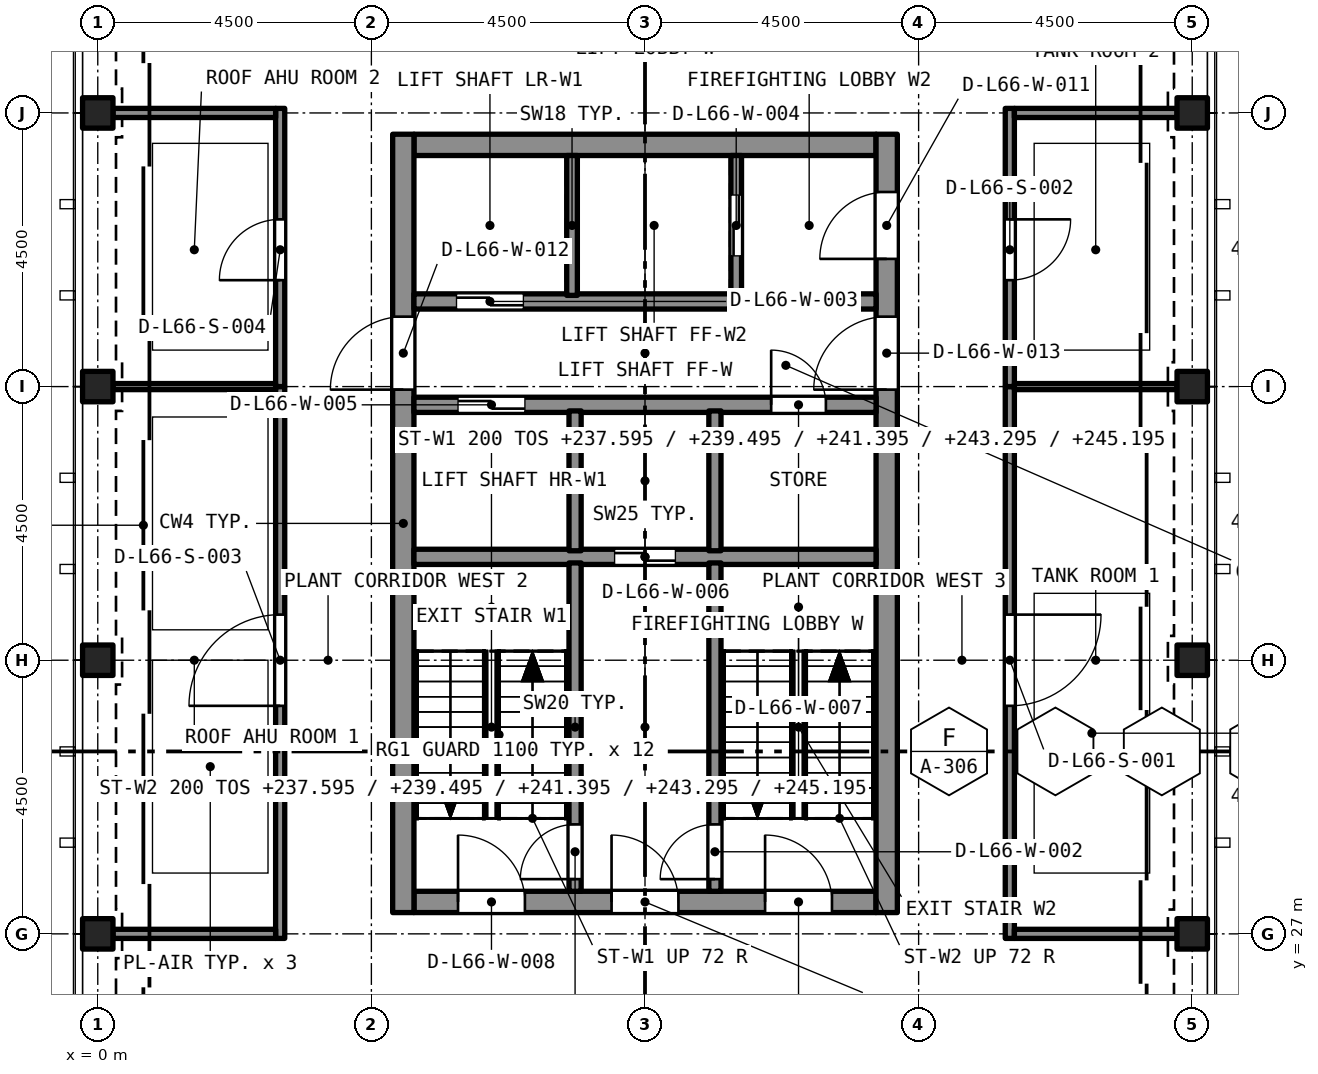
"""IFC4 building model, lengths in metres.
Left out: names, types, materials, properties, quantities, classifications, styles, units other than length and angle.
Written with IfcOpenShell. Run it as: python <this file> out.ifc"""

import sys

from ifc_helpers import new_model, si_unit, direction, frame, frame_2d, origin, origin_2d, place, context, subcontext, project, spatial, rectangle, hollow_rectangle, extrude, element, fill, save


model = new_model("IFC4")
c1 = context("Model", 3, precision=1e-05, world=origin(), true_north=direction((0.0, 1.0)))
c2 = subcontext(c1, "Body", "Model", "MODEL_VIEW")
j1 = project(units=[si_unit("LENGTHUNIT", "METRE"), si_unit("PLANEANGLEUNIT", "RADIAN")], contexts=[c1])
p1 = place(None, origin())
s1 = spatial("IfcSite", under=j1, at=p1, CompositionType="ELEMENT")
p2 = place(p1, origin())
s2 = spatial("IfcBuilding", under=s1, at=p2, CompositionType="ELEMENT")
p3 = place(p2, frame((0.0, 0.0, 235.695)))
s3 = spatial("IfcBuildingStorey", under=s2, at=p3, CompositionType="ELEMENT", Elevation=235.695)
p4 = place(p3, frame((5.2, 27.525, 0.0), z_axis=(0.0, 0.0, 1.0), x_axis=(1.0, 0.0, 0.0)))
e1 = element("IfcWall", 1, at=p4, inside=s3, PredefinedType="SOLIDWALL", context=c2, shape_type="SweptSolid", body=[
    extrude(rectangle(XDim=7.6, YDim=0.35, at=frame_2d((3.8, 0.0))), origin(), (0.0, 0.0, 1.0), 11.4),
])
p5 = place(p4, frame((0.725, 0.0, 0.0)))
e2 = element("IfcOpeningElement", 2, at=p5, cuts=e1, PredefinedType="OPENING", context=c2, shape_type="SweptSolid", body=[
    extrude(rectangle(XDim=1.1, YDim=2.1, at=frame_2d((0.55, 1.05))), frame((0.0, 0.185, 0.0), z_axis=(0.0, -1.0, 0.0), x_axis=(1.0, 0.0, 0.0)), (0.0, 0.0, 1.0), 0.37),
])
p6 = place(p4, frame((3.25, 0.0, 0.0)))
e3 = element("IfcOpeningElement", 3, at=p6, cuts=e1, PredefinedType="OPENING", context=c2, shape_type="SweptSolid", body=[
    extrude(rectangle(XDim=1.1, YDim=2.1, at=frame_2d((0.55, 1.05))), frame((0.0, 0.185, 0.0), z_axis=(0.0, -1.0, 0.0), x_axis=(1.0, 0.0, 0.0)), (0.0, 0.0, 1.0), 0.37),
])
p7 = place(p4, frame((5.775, 0.0, 0.0)))
e4 = element("IfcOpeningElement", 4, at=p7, cuts=e1, PredefinedType="OPENING", context=c2, shape_type="SweptSolid", body=[
    extrude(rectangle(XDim=1.1, YDim=2.1, at=frame_2d((0.55, 1.05))), frame((0.0, 0.185, 0.0), z_axis=(0.0, -1.0, 0.0), x_axis=(1.0, 0.0, 0.0)), (0.0, 0.0, 1.0), 0.37),
])
p8 = place(p3, frame((5.2, 39.975, 0.0), z_axis=(0.0, 0.0, 1.0), x_axis=(1.0, 0.0, 0.0)))
e5 = element("IfcWall", 5, at=p8, inside=s3, PredefinedType="SOLIDWALL", context=c2, shape_type="SweptSolid", body=[
    extrude(rectangle(XDim=7.6, YDim=0.35, at=frame_2d((3.8, 0.0))), origin(), (0.0, 0.0, 1.0), 11.4),
])
p9 = place(p3, frame((5.025, 27.35, 0.0), z_axis=(0.0, 0.0, 1.0), x_axis=(0.0, 1.0, 0.0)))
e6 = element("IfcWall", 6, at=p9, inside=s3, PredefinedType="SOLIDWALL", context=c2, shape_type="SweptSolid", body=[
    extrude(rectangle(XDim=12.8, YDim=0.35, at=frame_2d((6.4, 0.0))), origin(), (0.0, 0.0, 1.0), 11.4),
])
p10 = place(p9, frame((8.6, 0.0, 0.0)))
e7 = element("IfcOpeningElement", 7, at=p10, cuts=e6, PredefinedType="OPENING", context=c2, shape_type="SweptSolid", body=[
    extrude(rectangle(XDim=1.2, YDim=2.1, at=frame_2d((0.6, 1.05))), frame((0.0, 0.185, 0.0), z_axis=(0.0, -1.0, 0.0), x_axis=(1.0, 0.0, 0.0)), (0.0, 0.0, 1.0), 0.37),
])
p11 = place(p3, frame((12.975, 27.35, 0.0), z_axis=(0.0, 0.0, 1.0), x_axis=(0.0, 1.0, 0.0)))
e8 = element("IfcWall", 8, at=p11, inside=s3, PredefinedType="SOLIDWALL", context=c2, shape_type="SweptSolid", body=[
    extrude(rectangle(XDim=12.8, YDim=0.35, at=frame_2d((6.4, 0.0))), origin(), (0.0, 0.0, 1.0), 11.4),
])
p12 = place(p11, frame((10.75, 0.0, 0.0)))
e9 = element("IfcOpeningElement", 9, at=p12, cuts=e8, PredefinedType="OPENING", context=c2, shape_type="SweptSolid", body=[
    extrude(rectangle(XDim=1.1, YDim=2.1, at=frame_2d((0.55, 1.05))), frame((0.0, 0.185, 0.0), z_axis=(0.0, -1.0, 0.0), x_axis=(1.0, 0.0, 0.0)), (0.0, 0.0, 1.0), 0.37),
])
p13 = place(p11, frame((8.6, 0.0, 0.0)))
e10 = element("IfcOpeningElement", 10, at=p13, cuts=e8, PredefinedType="OPENING", context=c2, shape_type="SweptSolid", body=[
    extrude(rectangle(XDim=1.2, YDim=2.1, at=frame_2d((0.6, 1.05))), frame((0.0, 0.185, 0.0), z_axis=(0.0, -1.0, 0.0), x_axis=(1.0, 0.0, 0.0)), (0.0, 0.0, 1.0), 0.37),
])
for number, where, z_axis, x_axis in (
    (11, (0.0, 27.0, 0.0), (0.0, 0.0, 1.0), (1.0, 0.0, 0.0)),
    (12, (18.0, 27.0, 0.0), (0.0, 0.0, 1.0), (1.0, 0.0, 0.0)),
    (13, (0.0, 31.5, 0.0), (0.0, 0.0, 1.0), (1.0, 0.0, 0.0)),
    (14, (18.0, 31.5, 0.0), (0.0, 0.0, 1.0), (1.0, 0.0, 0.0)),
    (15, (0.0, 36.0, 0.0), (0.0, 0.0, 1.0), (1.0, 0.0, 0.0)),
    (16, (18.0, 36.0, 0.0), (0.0, 0.0, 1.0), (1.0, 0.0, 0.0)),
    (17, (0.0, 40.5, 0.0), (0.0, 0.0, 1.0), (1.0, 0.0, 0.0)),
    (18, (18.0, 40.5, 0.0), (0.0, 0.0, 1.0), (1.0, 0.0, 0.0)),
):
    element("IfcColumn", number, at=place(p3, frame(where, z_axis=z_axis, x_axis=x_axis)), inside=s3, PredefinedType="COLUMN", context=c2, shape_type="SweptSolid", body=[
        extrude(hollow_rectangle(XDim=0.5, YDim=0.5, WallThickness=0.04, at=origin_2d()), origin(), (0.0, 0.0, 1.0), 11.4),
    ])
p14 = place(p3, frame((5.2, 33.2, 0.0), z_axis=(0.0, 0.0, 1.0), x_axis=(1.0, 0.0, 0.0)))
e19 = element("IfcWall", 19, at=p14, inside=s3, PredefinedType="SOLIDWALL", context=c2, shape_type="SweptSolid", body=[
    extrude(rectangle(XDim=7.6, YDim=0.25, at=frame_2d((3.8, 0.0))), origin(), (0.0, 0.0, 1.0), 11.05),
])
p15 = place(p14, frame((3.3, 0.0, 0.0)))
e20 = element("IfcOpeningElement", 20, at=p15, cuts=e19, PredefinedType="OPENING", context=c2, shape_type="SweptSolid", body=[
    extrude(rectangle(XDim=1.0, YDim=2.1, at=frame_2d((0.5, 1.05))), frame((0.0, 0.135, 0.0), z_axis=(0.0, -1.0, 0.0), x_axis=(1.0, 0.0, 0.0)), (0.0, 0.0, 1.0), 0.27),
])
p16 = place(p3, frame((5.2, 35.7, 0.0), z_axis=(0.0, 0.0, 1.0), x_axis=(1.0, 0.0, 0.0)))
e21 = element("IfcWall", 21, at=p16, inside=s3, PredefinedType="SOLIDWALL", context=c2, shape_type="SweptSolid", body=[
    extrude(rectangle(XDim=7.6, YDim=0.25, at=frame_2d((3.8, 0.0))), origin(), (0.0, 0.0, 1.0), 11.05),
])
p17 = place(p16, frame((0.725, 0.0, 0.0)))
e22 = element("IfcOpeningElement", 22, at=p17, cuts=e21, PredefinedType="OPENING", context=c2, shape_type="SweptSolid", body=[
    extrude(rectangle(XDim=1.1, YDim=2.4, at=frame_2d((0.55, 1.2))), frame((0.0, 0.135, 0.0), z_axis=(0.0, -1.0, 0.0), x_axis=(1.0, 0.0, 0.0)), (0.0, 0.0, 1.0), 0.27),
])
p18 = place(p16, frame((5.875, 0.0, 0.0)))
e23 = element("IfcOpeningElement", 23, at=p18, cuts=e21, PredefinedType="OPENING", context=c2, shape_type="SweptSolid", body=[
    extrude(rectangle(XDim=0.9, YDim=2.1, at=frame_2d((0.45, 1.05))), frame((0.0, 0.135, 0.0), z_axis=(0.0, -1.0, 0.0), x_axis=(1.0, 0.0, 0.0)), (0.0, 0.0, 1.0), 0.27),
])
p19 = place(p3, frame((5.2, 37.4, 0.0), z_axis=(0.0, 0.0, 1.0), x_axis=(1.0, 0.0, 0.0)))
e24 = element("IfcWall", 24, at=p19, inside=s3, PredefinedType="SOLIDWALL", context=c2, shape_type="SweptSolid", body=[
    extrude(rectangle(XDim=7.6, YDim=0.25, at=frame_2d((3.8, 0.0))), origin(), (0.0, 0.0, 1.0), 11.05),
])
p20 = place(p19, frame((0.7, 0.0, 0.0)))
e25 = element("IfcOpeningElement", 25, at=p20, cuts=e24, PredefinedType="OPENING", context=c2, shape_type="SweptSolid", body=[
    extrude(rectangle(XDim=1.1, YDim=2.4, at=frame_2d((0.55, 1.2))), frame((0.0, 0.135, 0.0), z_axis=(0.0, -1.0, 0.0), x_axis=(1.0, 0.0, 0.0)), (0.0, 0.0, 1.0), 0.27),
])
p21 = place(p3, frame((7.85, 27.7, 0.0), z_axis=(0.0, 0.0, 1.0), x_axis=(0.0, 1.0, 0.0)))
e26 = element("IfcWall", 26, at=p21, inside=s3, PredefinedType="SOLIDWALL", context=c2, shape_type="SweptSolid", body=[
    extrude(rectangle(XDim=5.4, YDim=0.2, at=frame_2d((2.7, 0.0))), origin(), (0.0, 0.0, 1.0), 11.05),
])
p22 = place(p21, frame((0.2, 0.0, 0.0)))
e27 = element("IfcOpeningElement", 27, at=p22, cuts=e26, PredefinedType="OPENING", context=c2, shape_type="SweptSolid", body=[
    extrude(rectangle(XDim=0.9, YDim=2.1, at=frame_2d((0.45, 1.05))), frame((0.0, 0.11, 0.0), z_axis=(0.0, -1.0, 0.0), x_axis=(1.0, 0.0, 0.0)), (0.0, 0.0, 1.0), 0.22),
])
p23 = place(p3, frame((10.15, 27.7, 0.0), z_axis=(0.0, 0.0, 1.0), x_axis=(0.0, 1.0, 0.0)))
e28 = element("IfcWall", 28, at=p23, inside=s3, PredefinedType="SOLIDWALL", context=c2, shape_type="SweptSolid", body=[
    extrude(rectangle(XDim=5.4, YDim=0.2, at=frame_2d((2.7, 0.0))), origin(), (0.0, 0.0, 1.0), 11.05),
])
p24 = place(p23, frame((0.2, 0.0, 0.0)))
e29 = element("IfcOpeningElement", 29, at=p24, cuts=e28, PredefinedType="OPENING", context=c2, shape_type="SweptSolid", body=[
    extrude(rectangle(XDim=0.9, YDim=2.1, at=frame_2d((0.45, 1.05))), frame((0.0, 0.11, 0.0), z_axis=(0.0, -1.0, 0.0), x_axis=(1.0, 0.0, 0.0)), (0.0, 0.0, 1.0), 0.22),
])
for number, where, z_axis, x_axis in (
    (30, (7.85, 33.3, 0.0), (0.0, 0.0, 1.0), (0.0, 1.0, 0.0)),
    (31, (10.15, 33.3, 0.0), (0.0, 0.0, 1.0), (0.0, 1.0, 0.0)),
):
    element("IfcWall", number, at=place(p3, frame(where, z_axis=z_axis, x_axis=x_axis)), inside=s3, PredefinedType="SOLIDWALL", context=c2, shape_type="SweptSolid", body=[
        extrude(rectangle(XDim=2.3, YDim=0.2, at=frame_2d((1.15, 0.0))), origin(), (0.0, 0.0, 1.0), 11.05),
    ])
p25 = place(p3, frame((7.8, 37.5, 0.0), z_axis=(0.0, 0.0, 1.0), x_axis=(0.0, 1.0, 0.0)))
e32 = element("IfcWall", 32, at=p25, inside=s3, PredefinedType="SOLIDWALL", context=c2, shape_type="SweptSolid", body=[
    extrude(rectangle(XDim=2.3, YDim=0.175, at=frame_2d((1.15, 0.0))), origin(), (0.0, 0.0, 1.0), 11.05),
])
p26 = place(p3, frame((10.5, 37.5, 0.0), z_axis=(0.0, 0.0, 1.0), x_axis=(0.0, 1.0, 0.0)))
e33 = element("IfcWall", 33, at=p26, inside=s3, PredefinedType="SOLIDWALL", context=c2, shape_type="SweptSolid", body=[
    extrude(rectangle(XDim=2.3, YDim=0.175, at=frame_2d((1.15, 0.0))), origin(), (0.0, 0.0, 1.0), 11.05),
])
p27 = place(p26, frame((0.65, 0.0, 0.0)))
e34 = element("IfcOpeningElement", 34, at=p27, cuts=e33, PredefinedType="OPENING", context=c2, shape_type="SweptSolid", body=[
    extrude(rectangle(XDim=1.0, YDim=2.1, at=frame_2d((0.5, 1.05))), frame((0.0, 0.097, 0.0), z_axis=(0.0, -1.0, 0.0), x_axis=(1.0, 0.0, 0.0)), (0.0, 0.0, 1.0), 0.195),
])
p28 = place(p3, frame((15.0, 36.0, 0.0), z_axis=(0.0, 0.0, 1.0), x_axis=(0.0, -1.0, 0.0)))
e35 = element("IfcWall", 35, at=p28, inside=s3, PredefinedType="PARTITIONING", context=c2, shape_type="SweptSolid", body=[
    extrude(rectangle(XDim=9.075, YDim=0.15, at=frame_2d((4.538, 0.0))), origin(), (0.0, 0.0, 1.0), 11.05),
])
p29 = place(p28, frame((3.75, 0.0, 0.0)))
e36 = element("IfcOpeningElement", 36, at=p29, cuts=e35, PredefinedType="OPENING", context=c2, shape_type="SweptSolid", body=[
    extrude(rectangle(XDim=1.5, YDim=2.4, at=frame_2d((0.75, 1.2))), frame((0.0, 0.085, 0.0), z_axis=(0.0, -1.0, 0.0), x_axis=(1.0, 0.0, 0.0)), (0.0, 0.0, 1.0), 0.17),
])
p30 = place(p3, frame((15.0, 40.575, 0.0), z_axis=(0.0, 0.0, 1.0), x_axis=(0.0, -1.0, 0.0)))
e37 = element("IfcWall", 37, at=p30, inside=s3, PredefinedType="PARTITIONING", context=c2, shape_type="SweptSolid", body=[
    extrude(rectangle(XDim=4.575, YDim=0.15, at=frame_2d((2.288, 0.0))), origin(), (0.0, 0.0, 1.0), 11.05),
])
p31 = place(p30, frame((1.825, 0.0, 0.0)))
e38 = element("IfcOpeningElement", 38, at=p31, cuts=e37, PredefinedType="OPENING", context=c2, shape_type="SweptSolid", body=[
    extrude(rectangle(XDim=1.0, YDim=2.1, at=frame_2d((0.5, 1.05))), frame((0.0, 0.085, 0.0), z_axis=(0.0, -1.0, 0.0), x_axis=(1.0, 0.0, 0.0)), (0.0, 0.0, 1.0), 0.17),
])
p32 = place(p3, frame((3.0, 26.925, 0.0), z_axis=(0.0, 0.0, 1.0), x_axis=(0.0, 1.0, 0.0)))
e39 = element("IfcWall", 39, at=p32, inside=s3, PredefinedType="PARTITIONING", context=c2, shape_type="SweptSolid", body=[
    extrude(rectangle(XDim=9.075, YDim=0.15, at=frame_2d((4.538, 0.0))), origin(), (0.0, 0.0, 1.0), 11.05),
])
p33 = place(p32, frame((3.825, 0.0, 0.0)))
e40 = element("IfcOpeningElement", 40, at=p33, cuts=e39, PredefinedType="OPENING", context=c2, shape_type="SweptSolid", body=[
    extrude(rectangle(XDim=1.5, YDim=2.4, at=frame_2d((0.75, 1.2))), frame((0.0, 0.085, 0.0), z_axis=(0.0, -1.0, 0.0), x_axis=(1.0, 0.0, 0.0)), (0.0, 0.0, 1.0), 0.17),
])
p34 = place(p3, frame((3.0, 36.0, 0.0), z_axis=(0.0, 0.0, 1.0), x_axis=(0.0, 1.0, 0.0)))
e41 = element("IfcWall", 41, at=p34, inside=s3, PredefinedType="PARTITIONING", context=c2, shape_type="SweptSolid", body=[
    extrude(rectangle(XDim=4.575, YDim=0.15, at=frame_2d((2.288, 0.0))), origin(), (0.0, 0.0, 1.0), 11.05),
])
p35 = place(p34, frame((1.75, 0.0, 0.0)))
e42 = element("IfcOpeningElement", 42, at=p35, cuts=e41, PredefinedType="OPENING", context=c2, shape_type="SweptSolid", body=[
    extrude(rectangle(XDim=1.0, YDim=2.1, at=frame_2d((0.5, 1.05))), frame((0.0, 0.085, 0.0), z_axis=(0.0, -1.0, 0.0), x_axis=(1.0, 0.0, 0.0)), (0.0, 0.0, 1.0), 0.17),
])
for number, where, z_axis, x_axis in (
    (43, (15.075, 27.0, 0.0), (0.0, 0.0, 1.0), (1.0, 0.0, 0.0)),
    (44, (0.25, 27.0, 0.0), (0.0, 0.0, 1.0), (1.0, 0.0, 0.0)),
    (45, (15.075, 40.5, 0.0), (0.0, 0.0, 1.0), (1.0, 0.0, 0.0)),
    (46, (0.25, 40.5, 0.0), (0.0, 0.0, 1.0), (1.0, 0.0, 0.0)),
):
    element("IfcWall", number, at=place(p3, frame(where, z_axis=z_axis, x_axis=x_axis)), inside=s3, PredefinedType="PARTITIONING", context=c2, shape_type="SweptSolid", body=[
        extrude(rectangle(XDim=2.675, YDim=0.15, at=frame_2d((1.337, 0.0))), origin(), (0.0, 0.0, 1.0), 11.05),
    ])
for number, where, z_axis, x_axis in (
    (47, (15.075, 36.0, 0.0), (0.0, 0.0, 1.0), (1.0, 0.0, 0.0)),
    (48, (0.25, 36.0, 0.0), (0.0, 0.0, 1.0), (1.0, 0.0, 0.0)),
):
    element("IfcWall", number, at=place(p3, frame(where, z_axis=z_axis, x_axis=x_axis)), inside=s3, PredefinedType="PARTITIONING", context=c2, shape_type="SweptSolid", body=[
        extrude(rectangle(XDim=2.675, YDim=0.1, at=frame_2d((1.337, 0.0))), origin(), (0.0, 0.0, 1.0), 11.05),
    ])
p36 = place(p22, origin())
e49 = element("IfcDoor", 49, at=p36, inside=s3, OperationType="SINGLE_SWING_LEFT", PredefinedType="DOOR", context=c2, shape_type="SweptSolid", body=[
    extrude(rectangle(XDim=0.9, YDim=2.1, at=frame_2d((0.45, 1.05))), frame((0.0, 0.025, 0.0), z_axis=(0.0, -1.0, 0.0), x_axis=(1.0, 0.0, 0.0)), (0.0, 0.0, 1.0), 0.05),
])
fill(e27, e49)
p37 = place(p24, origin())
e50 = element("IfcDoor", 50, at=p37, inside=s3, OperationType="SINGLE_SWING_LEFT", PredefinedType="DOOR", context=c2, shape_type="SweptSolid", body=[
    extrude(rectangle(XDim=0.9, YDim=2.1, at=frame_2d((0.45, 1.05))), frame((0.0, 0.025, 0.0), z_axis=(0.0, -1.0, 0.0), x_axis=(1.0, 0.0, 0.0)), (0.0, 0.0, 1.0), 0.05),
])
fill(e29, e50)
p38 = place(p20, origin())
e51 = element("IfcDoor", 51, at=p38, inside=s3, OperationType="SLIDING_TO_LEFT", PredefinedType="DOOR", context=c2, shape_type="SweptSolid", body=[
    extrude(rectangle(XDim=1.1, YDim=2.4, at=frame_2d((0.55, 1.2))), frame((0.0, 0.025, 0.0), z_axis=(0.0, -1.0, 0.0), x_axis=(1.0, 0.0, 0.0)), (0.0, 0.0, 1.0), 0.05),
])
fill(e25, e51)
p39 = place(p27, origin())
e52 = element("IfcDoor", 52, at=p39, inside=s3, OperationType="SLIDING_TO_LEFT", PredefinedType="DOOR", context=c2, shape_type="SweptSolid", body=[
    extrude(rectangle(XDim=1.0, YDim=2.1, at=frame_2d((0.5, 1.05))), frame((0.0, 0.025, 0.0), z_axis=(0.0, -1.0, 0.0), x_axis=(1.0, 0.0, 0.0)), (0.0, 0.0, 1.0), 0.05),
])
fill(e34, e52)
p40 = place(p17, origin())
e53 = element("IfcDoor", 53, at=p40, inside=s3, OperationType="SLIDING_TO_LEFT", PredefinedType="DOOR", context=c2, shape_type="SweptSolid", body=[
    extrude(rectangle(XDim=1.1, YDim=2.4, at=frame_2d((0.55, 1.2))), frame((0.0, 0.025, 0.0), z_axis=(0.0, -1.0, 0.0), x_axis=(1.0, 0.0, 0.0)), (0.0, 0.0, 1.0), 0.05),
])
fill(e22, e53)
p41 = place(p15, origin())
e54 = element("IfcDoor", 54, at=p41, inside=s3, OperationType="SLIDING_TO_LEFT", PredefinedType="DOOR", context=c2, shape_type="SweptSolid", body=[
    extrude(rectangle(XDim=1.0, YDim=2.1, at=frame_2d((0.5, 1.05))), frame((0.0, 0.025, 0.0), z_axis=(0.0, -1.0, 0.0), x_axis=(1.0, 0.0, 0.0)), (0.0, 0.0, 1.0), 0.05),
])
fill(e20, e54)
p42 = place(p18, origin())
e55 = element("IfcDoor", 55, at=p42, inside=s3, OperationType="SINGLE_SWING_LEFT", PredefinedType="DOOR", context=c2, shape_type="SweptSolid", body=[
    extrude(rectangle(XDim=0.9, YDim=2.1, at=frame_2d((0.45, 1.05))), frame((0.0, 0.025, 0.0), z_axis=(0.0, -1.0, 0.0), x_axis=(1.0, 0.0, 0.0)), (0.0, 0.0, 1.0), 0.05),
])
fill(e23, e55)
p43 = place(p5, origin())
e56 = element("IfcDoor", 56, at=p43, inside=s3, OperationType="SINGLE_SWING_LEFT", PredefinedType="DOOR", context=c2, shape_type="SweptSolid", body=[
    extrude(rectangle(XDim=1.1, YDim=2.1, at=frame_2d((0.55, 1.05))), frame((0.0, 0.025, 0.0), z_axis=(0.0, -1.0, 0.0), x_axis=(1.0, 0.0, 0.0)), (0.0, 0.0, 1.0), 0.05),
])
fill(e2, e56)
p44 = place(p6, origin())
e57 = element("IfcDoor", 57, at=p44, inside=s3, OperationType="SINGLE_SWING_LEFT", PredefinedType="DOOR", context=c2, shape_type="SweptSolid", body=[
    extrude(rectangle(XDim=1.1, YDim=2.1, at=frame_2d((0.55, 1.05))), frame((0.0, 0.025, 0.0), z_axis=(0.0, -1.0, 0.0), x_axis=(1.0, 0.0, 0.0)), (0.0, 0.0, 1.0), 0.05),
])
fill(e3, e57)
p45 = place(p7, origin())
e58 = element("IfcDoor", 58, at=p45, inside=s3, OperationType="SINGLE_SWING_LEFT", PredefinedType="DOOR", context=c2, shape_type="SweptSolid", body=[
    extrude(rectangle(XDim=1.1, YDim=2.1, at=frame_2d((0.55, 1.05))), frame((0.0, 0.025, 0.0), z_axis=(0.0, -1.0, 0.0), x_axis=(1.0, 0.0, 0.0)), (0.0, 0.0, 1.0), 0.05),
])
fill(e4, e58)
p46 = place(p12, origin())
e59 = element("IfcDoor", 59, at=p46, inside=s3, OperationType="SINGLE_SWING_LEFT", PredefinedType="DOOR", context=c2, shape_type="SweptSolid", body=[
    extrude(rectangle(XDim=1.1, YDim=2.1, at=frame_2d((0.55, 1.05))), frame((0.0, 0.025, 0.0), z_axis=(0.0, -1.0, 0.0), x_axis=(1.0, 0.0, 0.0)), (0.0, 0.0, 1.0), 0.05),
])
fill(e9, e59)
p47 = place(p10, origin())
e60 = element("IfcDoor", 60, at=p47, inside=s3, OperationType="SINGLE_SWING_LEFT", PredefinedType="DOOR", context=c2, shape_type="SweptSolid", body=[
    extrude(rectangle(XDim=1.2, YDim=2.1, at=frame_2d((0.6, 1.05))), frame((0.0, 0.025, 0.0), z_axis=(0.0, -1.0, 0.0), x_axis=(1.0, 0.0, 0.0)), (0.0, 0.0, 1.0), 0.05),
])
fill(e7, e60)
p48 = place(p13, origin())
e61 = element("IfcDoor", 61, at=p48, inside=s3, OperationType="SINGLE_SWING_LEFT", PredefinedType="DOOR", context=c2, shape_type="SweptSolid", body=[
    extrude(rectangle(XDim=1.2, YDim=2.1, at=frame_2d((0.6, 1.05))), frame((0.0, 0.025, 0.0), z_axis=(0.0, -1.0, 0.0), x_axis=(1.0, 0.0, 0.0)), (0.0, 0.0, 1.0), 0.05),
])
fill(e10, e61)
p49 = place(p29, origin())
e62 = element("IfcDoor", 62, at=p49, inside=s3, OperationType="DOUBLE_DOOR_SINGLE_SWING", PredefinedType="DOOR", context=c2, shape_type="SweptSolid", body=[
    extrude(rectangle(XDim=1.5, YDim=2.4, at=frame_2d((0.75, 1.2))), frame((0.0, 0.025, 0.0), z_axis=(0.0, -1.0, 0.0), x_axis=(1.0, 0.0, 0.0)), (0.0, 0.0, 1.0), 0.05),
])
fill(e36, e62)
p50 = place(p31, origin())
e63 = element("IfcDoor", 63, at=p50, inside=s3, OperationType="SINGLE_SWING_RIGHT", PredefinedType="DOOR", context=c2, shape_type="SweptSolid", body=[
    extrude(rectangle(XDim=1.0, YDim=2.1, at=frame_2d((0.5, 1.05))), frame((0.0, 0.025, 0.0), z_axis=(0.0, -1.0, 0.0), x_axis=(1.0, 0.0, 0.0)), (0.0, 0.0, 1.0), 0.05),
])
fill(e38, e63)
p51 = place(p33, origin())
e64 = element("IfcDoor", 64, at=p51, inside=s3, OperationType="DOUBLE_DOOR_SINGLE_SWING", PredefinedType="DOOR", context=c2, shape_type="SweptSolid", body=[
    extrude(rectangle(XDim=1.5, YDim=2.4, at=frame_2d((0.75, 1.2))), frame((0.0, 0.025, 0.0), z_axis=(0.0, -1.0, 0.0), x_axis=(1.0, 0.0, 0.0)), (0.0, 0.0, 1.0), 0.05),
])
fill(e40, e64)
p52 = place(p35, origin())
e65 = element("IfcDoor", 65, at=p52, inside=s3, OperationType="SINGLE_SWING_LEFT", PredefinedType="DOOR", context=c2, shape_type="SweptSolid", body=[
    extrude(rectangle(XDim=1.0, YDim=2.1, at=frame_2d((0.5, 1.05))), frame((0.0, 0.025, 0.0), z_axis=(0.0, -1.0, 0.0), x_axis=(1.0, 0.0, 0.0)), (0.0, 0.0, 1.0), 0.05),
])
fill(e42, e65)
save(model, sys.argv[1])
